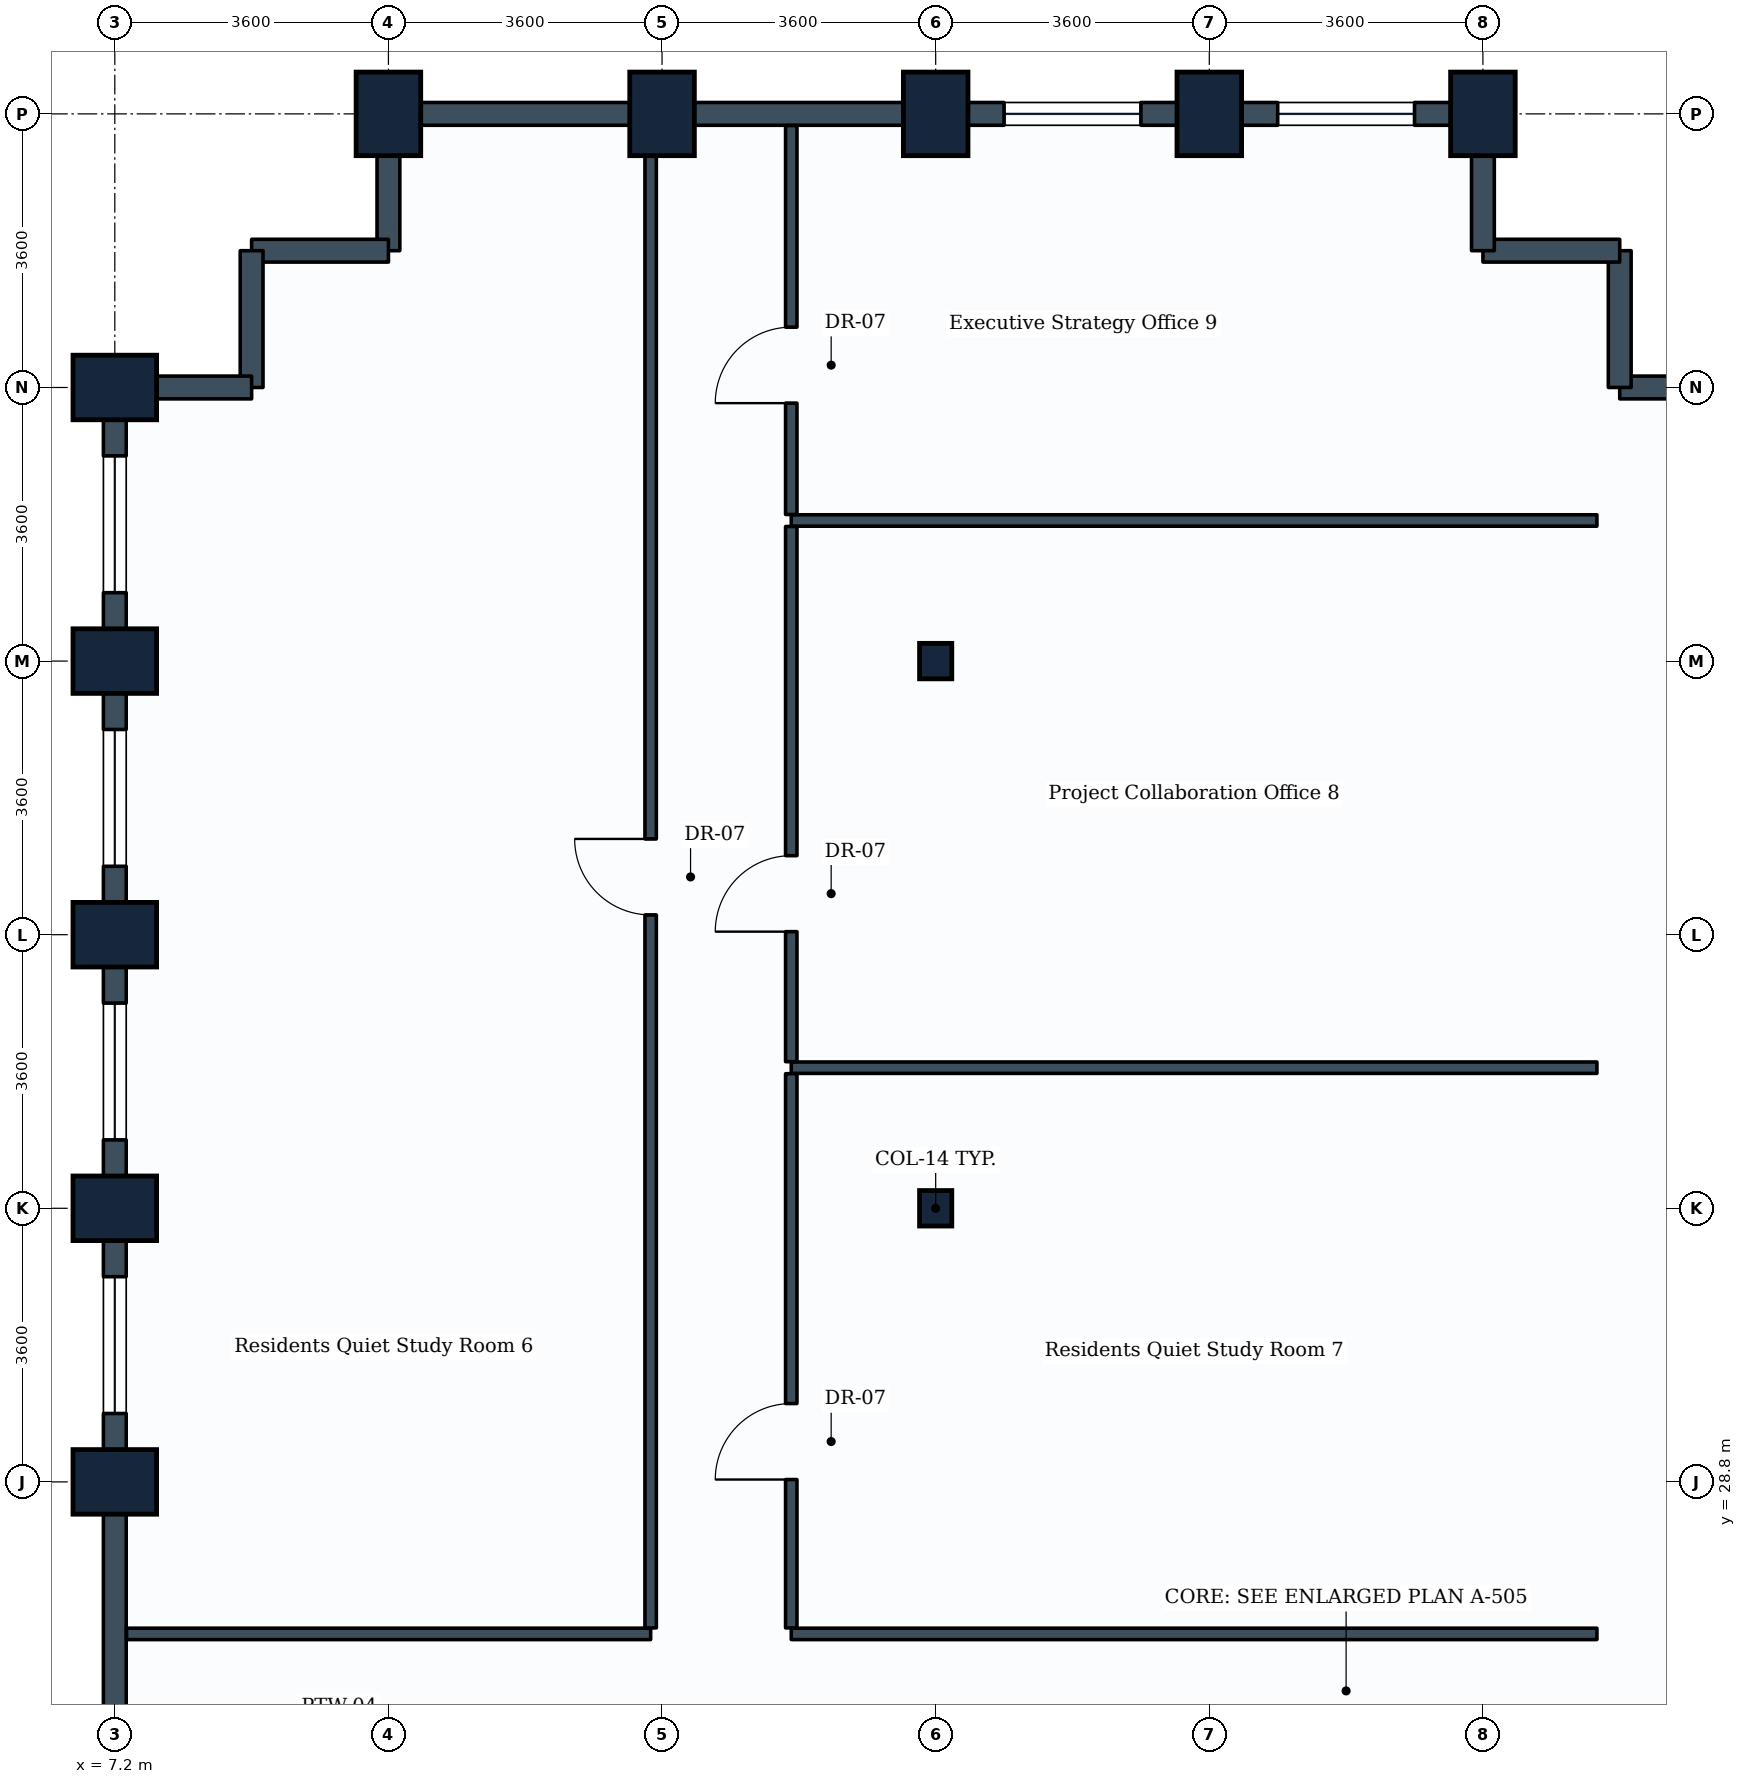
"""IFC4 building model, lengths in metres.
Left out: names, types, materials, properties, quantities, classifications, styles, units other than length and angle.
Written with IfcOpenShell. Run it as: python <this file> out.ifc"""

import sys

from ifc_helpers import new_model, si_unit, direction, frame, frame_2d, origin, origin_2d, place, context, subcontext, project, spatial, rectangle, i_section, extrude, element, fill, save


model = new_model("IFC4")
c1 = context("Model", 3, precision=1e-05, world=origin(), true_north=direction((0.0, 1.0)))
c2 = subcontext(c1, "Body", "Model", "MODEL_VIEW")
j1 = project(units=[si_unit("LENGTHUNIT", "METRE"), si_unit("PLANEANGLEUNIT", "RADIAN")], contexts=[c1])
p1 = place(None, origin())
s1 = spatial("IfcSite", under=j1, at=p1, CompositionType="ELEMENT")
p2 = place(p1, origin())
s2 = spatial("IfcBuilding", under=s1, at=p2, CompositionType="ELEMENT")
p3 = place(p2, frame((0.0, 0.0, 111.3)))
s3 = spatial("IfcBuildingStorey", under=s2, at=p3, CompositionType="ELEMENT", Elevation=111.3)
for number, where, z_axis, x_axis in (
    (1, (7.2, 28.8, 0.0), (0.0, 0.0, 1.0), (0.0, 1.0, 0.0)),
    (2, (7.2, 32.4, 0.0), (0.0, 0.0, 1.0), (0.0, 1.0, 0.0)),
    (3, (7.2, 36.0, 0.0), (0.0, 0.0, 1.0), (0.0, 1.0, 0.0)),
    (4, (7.2, 39.6, 0.0), (0.0, 0.0, 1.0), (0.0, 1.0, 0.0)),
    (5, (7.2, 43.2, 0.0), (0.0, 0.0, 1.0), (0.0, 1.0, 0.0)),
    (6, (10.8, 46.8, 0.0), (0.0, 0.0, 1.0), (1.0, 0.0, 0.0)),
    (7, (14.4, 46.8, 0.0), (0.0, 0.0, 1.0), (1.0, 0.0, 0.0)),
):
    element("IfcColumn", number, at=place(p3, frame(where, z_axis=z_axis, x_axis=x_axis)), inside=s3, PredefinedType="COLUMN", context=c2, shape_type="SweptSolid", body=[
        extrude(rectangle(XDim=0.85, YDim=1.1, at=origin_2d()), origin(), (0.0, 0.0, 1.0), 3.9),
    ])
for number, where, z_axis, x_axis in (
    (8, (18.0, 32.4, 0.0), (0.0, 0.0, 1.0), (1.0, 0.0, 0.0)),
    (9, (18.0, 39.6, 0.0), (0.0, 0.0, 1.0), (1.0, 0.0, 0.0)),
):
    element("IfcColumn", number, at=place(p3, frame(where, z_axis=z_axis, x_axis=x_axis)), inside=s3, PredefinedType="COLUMN", context=c2, shape_type="SweptSolid", body=[
        extrude(i_section(OverallWidth=0.424, OverallDepth=0.467, WebThickness=0.033, FlangeThickness=0.053, FilletRadius=0.015, at=origin_2d()), origin(), (0.0, 0.0, 1.0), 3.9),
    ])
for number, where, z_axis, x_axis in (
    (10, (18.0, 46.8, 0.0), (0.0, 0.0, 1.0), (1.0, 0.0, 0.0)),
    (11, (21.6, 46.8, 0.0), (0.0, 0.0, 1.0), (1.0, 0.0, 0.0)),
    (12, (25.2, 46.8, 0.0), (0.0, 0.0, 1.0), (1.0, 0.0, 0.0)),
):
    element("IfcColumn", number, at=place(p3, frame(where, z_axis=z_axis, x_axis=x_axis)), inside=s3, PredefinedType="COLUMN", context=c2, shape_type="SweptSolid", body=[
        extrude(rectangle(XDim=0.85, YDim=1.1, at=origin_2d()), origin(), (0.0, 0.0, 1.0), 3.9),
    ])
p4 = place(p3, frame((27.0, 43.2, 0.0), z_axis=(0.0, 0.0, 1.0), x_axis=(1.0, 0.0, 0.0)))
e13 = element("IfcWall", 13, at=p4, inside=s3, PredefinedType="STANDARD", context=c2, shape_type="SweptSolid", body=[
    extrude(rectangle(XDim=1.8, YDim=0.3, at=frame_2d((0.9, 0.0))), origin(), (0.0, 0.0, 1.0), 3.03),
])
for number, where, z_axis, x_axis in (
    (14, (27.0, 43.2, 0.0), (0.0, 0.0, 1.0), (0.0, 1.0, 0.0)),
    (15, (25.2, 45.0, 0.0), (0.0, 0.0, 1.0), (1.0, 0.0, 0.0)),
):
    element("IfcWall", number, at=place(p3, frame(where, z_axis=z_axis, x_axis=x_axis)), inside=s3, PredefinedType="STANDARD", context=c2, shape_type="SweptSolid", body=[
        extrude(rectangle(XDim=1.8, YDim=0.3, at=frame_2d((0.9, 0.0))), origin(), (0.0, 0.0, 1.0), 3.565),
    ])
p5 = place(p3, frame((25.2, 45.0, 0.0), z_axis=(0.0, 0.0, 1.0), x_axis=(0.0, 1.0, 0.0)))
e16 = element("IfcWall", 16, at=p5, inside=s3, PredefinedType="STANDARD", context=c2, shape_type="SweptSolid", body=[
    extrude(rectangle(XDim=1.8, YDim=0.3, at=frame_2d((0.9, 0.0))), origin(), (0.0, 0.0, 1.0), 3.03),
])
p6 = place(p3, frame((21.6, 46.8, 0.0), z_axis=(0.0, 0.0, 1.0), x_axis=(1.0, 0.0, 0.0)))
e17 = element("IfcWall", 17, at=p6, inside=s3, PredefinedType="STANDARD", context=c2, shape_type="SweptSolid", body=[
    extrude(rectangle(XDim=3.6, YDim=0.3, at=frame_2d((1.8, 0.0))), origin(), (0.0, 0.0, 1.0), 3.03),
])
p7 = place(p6, frame((0.9, 0.0, 0.85)))
e18 = element("IfcOpeningElement", 18, at=p7, cuts=e17, PredefinedType="OPENING", context=c2, shape_type="SweptSolid", body=[
    extrude(rectangle(XDim=1.8, YDim=1.35, at=frame_2d((0.9, 0.675))), frame((0.0, 0.16, 0.0), z_axis=(0.0, -1.0, 0.0), x_axis=(1.0, 0.0, 0.0)), (0.0, 0.0, 1.0), 0.32),
])
p8 = place(p3, frame((18.0, 46.8, 0.0), z_axis=(0.0, 0.0, 1.0), x_axis=(1.0, 0.0, 0.0)))
e19 = element("IfcWall", 19, at=p8, inside=s3, PredefinedType="STANDARD", context=c2, shape_type="SweptSolid", body=[
    extrude(rectangle(XDim=3.6, YDim=0.3, at=frame_2d((1.8, 0.0))), origin(), (0.0, 0.0, 1.0), 3.03),
])
p9 = place(p8, frame((0.9, 0.0, 0.85)))
e20 = element("IfcOpeningElement", 20, at=p9, cuts=e19, PredefinedType="OPENING", context=c2, shape_type="SweptSolid", body=[
    extrude(rectangle(XDim=1.8, YDim=1.35, at=frame_2d((0.9, 0.675))), frame((0.0, 0.16, 0.0), z_axis=(0.0, -1.0, 0.0), x_axis=(1.0, 0.0, 0.0)), (0.0, 0.0, 1.0), 0.32),
])
p10 = place(p3, frame((14.4, 46.8, 0.0), z_axis=(0.0, 0.0, 1.0), x_axis=(1.0, 0.0, 0.0)))
e21 = element("IfcWall", 21, at=p10, inside=s3, PredefinedType="STANDARD", context=c2, shape_type="SweptSolid", body=[
    extrude(rectangle(XDim=3.6, YDim=0.3, at=frame_2d((1.8, 0.0))), origin(), (0.0, 0.0, 1.0), 3.03),
])
p11 = place(p3, frame((10.8, 46.8, 0.0), z_axis=(0.0, 0.0, 1.0), x_axis=(1.0, 0.0, 0.0)))
e22 = element("IfcWall", 22, at=p11, inside=s3, PredefinedType="STANDARD", context=c2, shape_type="SweptSolid", body=[
    extrude(rectangle(XDim=3.6, YDim=0.3, at=frame_2d((1.8, 0.0))), origin(), (0.0, 0.0, 1.0), 3.03),
])
p12 = place(p3, frame((10.8, 45.0, 0.0), z_axis=(0.0, 0.0, 1.0), x_axis=(0.0, 1.0, 0.0)))
e23 = element("IfcWall", 23, at=p12, inside=s3, PredefinedType="STANDARD", context=c2, shape_type="SweptSolid", body=[
    extrude(rectangle(XDim=1.8, YDim=0.3, at=frame_2d((0.9, 0.0))), origin(), (0.0, 0.0, 1.0), 3.03),
])
for number, where, z_axis, x_axis in (
    (24, (9.0, 45.0, 0.0), (0.0, 0.0, 1.0), (1.0, 0.0, 0.0)),
    (25, (9.0, 43.2, 0.0), (0.0, 0.0, 1.0), (0.0, 1.0, 0.0)),
):
    element("IfcWall", number, at=place(p3, frame(where, z_axis=z_axis, x_axis=x_axis)), inside=s3, PredefinedType="STANDARD", context=c2, shape_type="SweptSolid", body=[
        extrude(rectangle(XDim=1.8, YDim=0.3, at=frame_2d((0.9, 0.0))), origin(), (0.0, 0.0, 1.0), 3.565),
    ])
p13 = place(p3, frame((7.2, 43.2, 0.0), z_axis=(0.0, 0.0, 1.0), x_axis=(1.0, 0.0, 0.0)))
e26 = element("IfcWall", 26, at=p13, inside=s3, PredefinedType="STANDARD", context=c2, shape_type="SweptSolid", body=[
    extrude(rectangle(XDim=1.8, YDim=0.3, at=frame_2d((0.9, 0.0))), origin(), (0.0, 0.0, 1.0), 3.03),
])
p14 = place(p3, frame((7.2, 39.6, 0.0), z_axis=(0.0, 0.0, 1.0), x_axis=(0.0, 1.0, 0.0)))
e27 = element("IfcWall", 27, at=p14, inside=s3, PredefinedType="STANDARD", context=c2, shape_type="SweptSolid", body=[
    extrude(rectangle(XDim=3.6, YDim=0.3, at=frame_2d((1.8, 0.0))), origin(), (0.0, 0.0, 1.0), 3.03),
])
p15 = place(p14, frame((0.9, 0.0, 0.85)))
e28 = element("IfcOpeningElement", 28, at=p15, cuts=e27, PredefinedType="OPENING", context=c2, shape_type="SweptSolid", body=[
    extrude(rectangle(XDim=1.8, YDim=1.35, at=frame_2d((0.9, 0.675))), frame((0.0, 0.16, 0.0), z_axis=(0.0, -1.0, 0.0), x_axis=(1.0, 0.0, 0.0)), (0.0, 0.0, 1.0), 0.32),
])
p16 = place(p3, frame((7.2, 36.0, 0.0), z_axis=(0.0, 0.0, 1.0), x_axis=(0.0, 1.0, 0.0)))
e29 = element("IfcWall", 29, at=p16, inside=s3, PredefinedType="STANDARD", context=c2, shape_type="SweptSolid", body=[
    extrude(rectangle(XDim=3.6, YDim=0.3, at=frame_2d((1.8, 0.0))), origin(), (0.0, 0.0, 1.0), 3.03),
])
p17 = place(p16, frame((0.9, 0.0, 0.85)))
e30 = element("IfcOpeningElement", 30, at=p17, cuts=e29, PredefinedType="OPENING", context=c2, shape_type="SweptSolid", body=[
    extrude(rectangle(XDim=1.8, YDim=1.35, at=frame_2d((0.9, 0.675))), frame((0.0, 0.16, 0.0), z_axis=(0.0, -1.0, 0.0), x_axis=(1.0, 0.0, 0.0)), (0.0, 0.0, 1.0), 0.32),
])
p18 = place(p3, frame((7.2, 32.4, 0.0), z_axis=(0.0, 0.0, 1.0), x_axis=(0.0, 1.0, 0.0)))
e31 = element("IfcWall", 31, at=p18, inside=s3, PredefinedType="STANDARD", context=c2, shape_type="SweptSolid", body=[
    extrude(rectangle(XDim=3.6, YDim=0.3, at=frame_2d((1.8, 0.0))), origin(), (0.0, 0.0, 1.0), 3.03),
])
p19 = place(p18, frame((0.9, 0.0, 0.85)))
e32 = element("IfcOpeningElement", 32, at=p19, cuts=e31, PredefinedType="OPENING", context=c2, shape_type="SweptSolid", body=[
    extrude(rectangle(XDim=1.8, YDim=1.35, at=frame_2d((0.9, 0.675))), frame((0.0, 0.16, 0.0), z_axis=(0.0, -1.0, 0.0), x_axis=(1.0, 0.0, 0.0)), (0.0, 0.0, 1.0), 0.32),
])
p20 = place(p3, frame((7.2, 28.8, 0.0), z_axis=(0.0, 0.0, 1.0), x_axis=(0.0, 1.0, 0.0)))
e33 = element("IfcWall", 33, at=p20, inside=s3, PredefinedType="STANDARD", context=c2, shape_type="SweptSolid", body=[
    extrude(rectangle(XDim=3.6, YDim=0.3, at=frame_2d((1.8, 0.0))), origin(), (0.0, 0.0, 1.0), 3.03),
])
p21 = place(p20, frame((0.9, 0.0, 0.85)))
e34 = element("IfcOpeningElement", 34, at=p21, cuts=e33, PredefinedType="OPENING", context=c2, shape_type="SweptSolid", body=[
    extrude(rectangle(XDim=1.8, YDim=1.35, at=frame_2d((0.9, 0.675))), frame((0.0, 0.16, 0.0), z_axis=(0.0, -1.0, 0.0), x_axis=(1.0, 0.0, 0.0)), (0.0, 0.0, 1.0), 0.32),
])
p22 = place(p3, frame((7.2, 25.2, 0.0), z_axis=(0.0, 0.0, 1.0), x_axis=(0.0, 1.0, 0.0)))
e35 = element("IfcWall", 35, at=p22, inside=s3, PredefinedType="STANDARD", context=c2, shape_type="SweptSolid", body=[
    extrude(rectangle(XDim=3.6, YDim=0.3, at=frame_2d((1.8, 0.0))), origin(), (0.0, 0.0, 1.0), 3.03),
])
p23 = place(p3, frame((7.354, 26.8, 0.0), z_axis=(0.0, 0.0, 1.0), x_axis=(1.0, 0.0, 0.0)))
e36 = element("IfcWall", 36, at=p23, inside=s3, PredefinedType="PARTITIONING", context=c2, shape_type="SweptSolid", body=[
    extrude(rectangle(XDim=6.896, YDim=0.15, at=frame_2d((3.448, 0.0))), origin(), (0.0, 0.0, 1.0), 3.03),
])
p24 = place(p3, frame((14.25, 26.879, 0.0), z_axis=(0.0, 0.0, 1.0), x_axis=(0.0, 1.0, 0.0)))
e37 = element("IfcWall", 37, at=p24, inside=s3, PredefinedType="PARTITIONING", context=c2, shape_type="SweptSolid", body=[
    extrude(rectangle(XDim=19.767, YDim=0.15, at=frame_2d((9.884, 0.0))), origin(), (0.0, 0.0, 1.0), 3.03),
])
p25 = place(p24, frame((9.381, 0.0, 0.0)))
e38 = element("IfcOpeningElement", 38, at=p25, cuts=e37, PredefinedType="OPENING", context=c2, shape_type="SweptSolid", body=[
    extrude(rectangle(XDim=1.0, YDim=2.1, at=frame_2d((0.5, 1.05))), frame((0.0, 0.085, 0.0), z_axis=(0.0, -1.0, 0.0), x_axis=(1.0, 0.0, 0.0)), (0.0, 0.0, 1.0), 0.17),
])
for number, where, z_axis, x_axis in (
    (39, (16.1, 26.8, 0.0), (0.0, 0.0, 1.0), (1.0, 0.0, 0.0)),
    (40, (16.1, 34.25, 0.0), (0.0, 0.0, 1.0), (1.0, 0.0, 0.0)),
):
    element("IfcWall", number, at=place(p3, frame(where, z_axis=z_axis, x_axis=x_axis)), inside=s3, PredefinedType="PARTITIONING", context=c2, shape_type="SweptSolid", body=[
        extrude(rectangle(XDim=10.6, YDim=0.15, at=frame_2d((5.3, 0.0))), origin(), (0.0, 0.0, 1.0), 3.11),
    ])
p26 = place(p3, frame((16.1, 26.879, 0.0), z_axis=(0.0, 0.0, 1.0), x_axis=(0.0, 1.0, 0.0)))
e41 = element("IfcWall", 41, at=p26, inside=s3, PredefinedType="PARTITIONING", context=c2, shape_type="SweptSolid", body=[
    extrude(rectangle(XDim=7.292, YDim=0.15, at=frame_2d((3.646, 0.0))), origin(), (0.0, 0.0, 1.0), 3.12),
])
p27 = place(p26, frame((1.952, 0.0, 0.0)))
e42 = element("IfcOpeningElement", 42, at=p27, cuts=e41, PredefinedType="OPENING", context=c2, shape_type="SweptSolid", body=[
    extrude(rectangle(XDim=1.0, YDim=2.1, at=frame_2d((0.5, 1.05))), frame((0.0, 0.085, 0.0), z_axis=(0.0, -1.0, 0.0), x_axis=(1.0, 0.0, 0.0)), (0.0, 0.0, 1.0), 0.17),
])
p28 = place(p3, frame((16.1, 41.45, 0.0), z_axis=(0.0, 0.0, 1.0), x_axis=(1.0, 0.0, 0.0)))
e43 = element("IfcWall", 43, at=p28, inside=s3, PredefinedType="PARTITIONING", context=c2, shape_type="SweptSolid", body=[
    extrude(rectangle(XDim=10.6, YDim=0.15, at=frame_2d((5.3, 0.0))), origin(), (0.0, 0.0, 1.0), 3.11),
])
p29 = place(p3, frame((16.1, 34.329, 0.0), z_axis=(0.0, 0.0, 1.0), x_axis=(0.0, 1.0, 0.0)))
e44 = element("IfcWall", 44, at=p29, inside=s3, PredefinedType="PARTITIONING", context=c2, shape_type="SweptSolid", body=[
    extrude(rectangle(XDim=7.042, YDim=0.15, at=frame_2d((3.521, 0.0))), origin(), (0.0, 0.0, 1.0), 3.12),
])
p30 = place(p29, frame((1.711, 0.0, 0.0)))
e45 = element("IfcOpeningElement", 45, at=p30, cuts=e44, PredefinedType="OPENING", context=c2, shape_type="SweptSolid", body=[
    extrude(rectangle(XDim=1.0, YDim=2.1, at=frame_2d((0.5, 1.05))), frame((0.0, 0.085, 0.0), z_axis=(0.0, -1.0, 0.0), x_axis=(1.0, 0.0, 0.0)), (0.0, 0.0, 1.0), 0.17),
])
p31 = place(p3, frame((16.1, 41.529, 0.0), z_axis=(0.0, 0.0, 1.0), x_axis=(0.0, 1.0, 0.0)))
e46 = element("IfcWall", 46, at=p31, inside=s3, PredefinedType="PARTITIONING", context=c2, shape_type="SweptSolid", body=[
    extrude(rectangle(XDim=5.117, YDim=0.15, at=frame_2d((2.559, 0.0))), origin(), (0.0, 0.0, 1.0), 3.03),
])
p32 = place(p31, frame((1.465, 0.0, 0.0)))
e47 = element("IfcOpeningElement", 47, at=p32, cuts=e46, PredefinedType="OPENING", context=c2, shape_type="SweptSolid", body=[
    extrude(rectangle(XDim=1.0, YDim=2.1, at=frame_2d((0.5, 1.05))), frame((0.0, 0.085, 0.0), z_axis=(0.0, -1.0, 0.0), x_axis=(1.0, 0.0, 0.0)), (0.0, 0.0, 1.0), 0.17),
])
p33 = place(p7, origin())
e48 = element("IfcWindow", 48, at=p33, inside=s3, PartitioningType="SINGLE_PANEL", PredefinedType="WINDOW", context=c2, shape_type="SweptSolid", body=[
    extrude(rectangle(XDim=1.8, YDim=1.35, at=frame_2d((0.9, 0.675))), frame((0.0, 0.03, 0.0), z_axis=(0.0, -1.0, 0.0), x_axis=(1.0, 0.0, 0.0)), (0.0, 0.0, 1.0), 0.06),
])
fill(e18, e48)
p34 = place(p9, origin())
e49 = element("IfcWindow", 49, at=p34, inside=s3, PartitioningType="SINGLE_PANEL", PredefinedType="WINDOW", context=c2, shape_type="SweptSolid", body=[
    extrude(rectangle(XDim=1.8, YDim=1.35, at=frame_2d((0.9, 0.675))), frame((0.0, 0.03, 0.0), z_axis=(0.0, -1.0, 0.0), x_axis=(1.0, 0.0, 0.0)), (0.0, 0.0, 1.0), 0.06),
])
fill(e20, e49)
p35 = place(p15, origin())
e50 = element("IfcWindow", 50, at=p35, inside=s3, PartitioningType="SINGLE_PANEL", PredefinedType="WINDOW", context=c2, shape_type="SweptSolid", body=[
    extrude(rectangle(XDim=1.8, YDim=1.35, at=frame_2d((0.9, 0.675))), frame((0.0, 0.03, 0.0), z_axis=(0.0, -1.0, 0.0), x_axis=(1.0, 0.0, 0.0)), (0.0, 0.0, 1.0), 0.06),
])
fill(e28, e50)
p36 = place(p17, origin())
e51 = element("IfcWindow", 51, at=p36, inside=s3, PartitioningType="SINGLE_PANEL", PredefinedType="WINDOW", context=c2, shape_type="SweptSolid", body=[
    extrude(rectangle(XDim=1.8, YDim=1.35, at=frame_2d((0.9, 0.675))), frame((0.0, 0.03, 0.0), z_axis=(0.0, -1.0, 0.0), x_axis=(1.0, 0.0, 0.0)), (0.0, 0.0, 1.0), 0.06),
])
fill(e30, e51)
p37 = place(p19, origin())
e52 = element("IfcWindow", 52, at=p37, inside=s3, PartitioningType="SINGLE_PANEL", PredefinedType="WINDOW", context=c2, shape_type="SweptSolid", body=[
    extrude(rectangle(XDim=1.8, YDim=1.35, at=frame_2d((0.9, 0.675))), frame((0.0, 0.03, 0.0), z_axis=(0.0, -1.0, 0.0), x_axis=(1.0, 0.0, 0.0)), (0.0, 0.0, 1.0), 0.06),
])
fill(e32, e52)
p38 = place(p21, origin())
e53 = element("IfcWindow", 53, at=p38, inside=s3, PartitioningType="SINGLE_PANEL", PredefinedType="WINDOW", context=c2, shape_type="SweptSolid", body=[
    extrude(rectangle(XDim=1.8, YDim=1.35, at=frame_2d((0.9, 0.675))), frame((0.0, 0.03, 0.0), z_axis=(0.0, -1.0, 0.0), x_axis=(1.0, 0.0, 0.0)), (0.0, 0.0, 1.0), 0.06),
])
fill(e34, e53)
p39 = place(p25, origin())
e54 = element("IfcDoor", 54, at=p39, inside=s3, OperationType="SINGLE_SWING_RIGHT", PredefinedType="DOOR", context=c2, shape_type="SweptSolid", body=[
    extrude(rectangle(XDim=1.0, YDim=2.1, at=frame_2d((0.5, 1.05))), frame((0.0, 0.025, 0.0), z_axis=(0.0, -1.0, 0.0), x_axis=(1.0, 0.0, 0.0)), (0.0, 0.0, 1.0), 0.05),
])
fill(e38, e54)
p40 = place(p27, origin())
e55 = element("IfcDoor", 55, at=p40, inside=s3, OperationType="SINGLE_SWING_LEFT", PredefinedType="DOOR", context=c2, shape_type="SweptSolid", body=[
    extrude(rectangle(XDim=1.0, YDim=2.1, at=frame_2d((0.5, 1.05))), frame((0.0, 0.025, 0.0), z_axis=(0.0, -1.0, 0.0), x_axis=(1.0, 0.0, 0.0)), (0.0, 0.0, 1.0), 0.05),
])
fill(e42, e55)
p41 = place(p30, origin())
e56 = element("IfcDoor", 56, at=p41, inside=s3, OperationType="SINGLE_SWING_LEFT", PredefinedType="DOOR", context=c2, shape_type="SweptSolid", body=[
    extrude(rectangle(XDim=1.0, YDim=2.1, at=frame_2d((0.5, 1.05))), frame((0.0, 0.025, 0.0), z_axis=(0.0, -1.0, 0.0), x_axis=(1.0, 0.0, 0.0)), (0.0, 0.0, 1.0), 0.05),
])
fill(e45, e56)
p42 = place(p32, origin())
e57 = element("IfcDoor", 57, at=p42, inside=s3, OperationType="SINGLE_SWING_LEFT", PredefinedType="DOOR", context=c2, shape_type="SweptSolid", body=[
    extrude(rectangle(XDim=1.0, YDim=2.1, at=frame_2d((0.5, 1.05))), frame((0.0, 0.025, 0.0), z_axis=(0.0, -1.0, 0.0), x_axis=(1.0, 0.0, 0.0)), (0.0, 0.0, 1.0), 0.05),
])
fill(e47, e57)
save(model, sys.argv[1])
